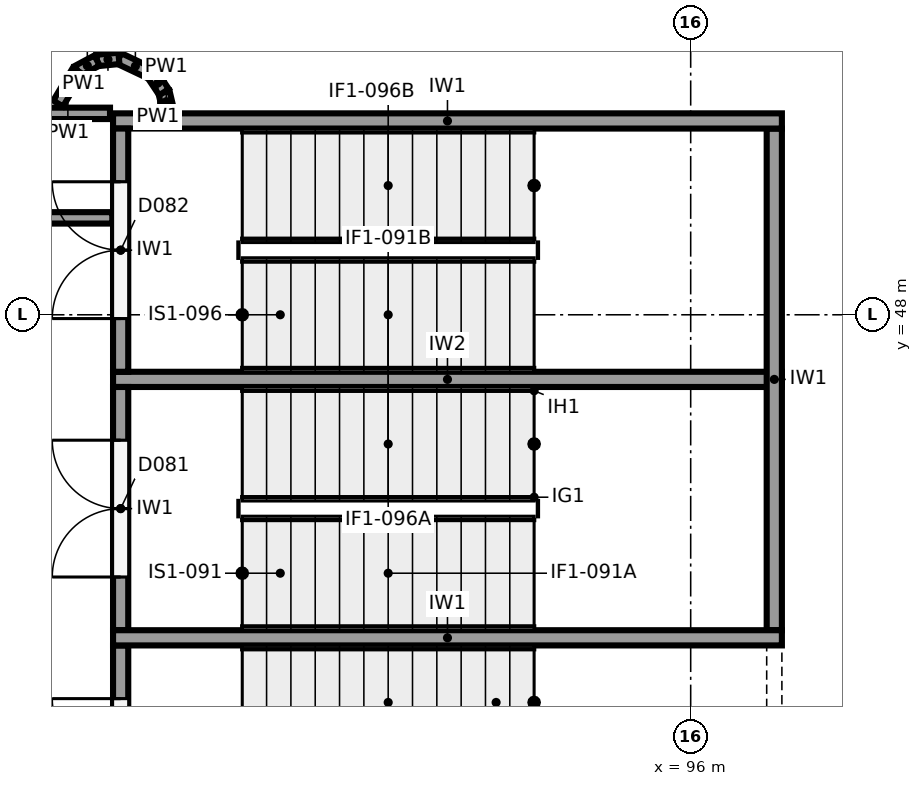
"""IFC4 building model, lengths in metres.
Left out: names, types, materials, properties, quantities, classifications, styles, units other than length and angle.
Written with IfcOpenShell. Run it as: python <this file> out.ifc"""

import sys

from ifc_helpers import new_model, si_unit, direction, frame, frame_2d, origin, place, context, subcontext, project, spatial, rectangle, extrude, element, fill, save


model = new_model("IFC4")
c1 = context("Model", 3, precision=1e-05, world=origin(), true_north=direction((0.0, 1.0)))
c2 = subcontext(c1, "Body", "Model", "MODEL_VIEW")
j1 = project(units=[si_unit("LENGTHUNIT", "METRE"), si_unit("PLANEANGLEUNIT", "RADIAN")], contexts=[c1])
p1 = place(None, origin())
s1 = spatial("IfcSite", under=j1, at=p1, CompositionType="ELEMENT")
p2 = place(p1, origin())
s2 = spatial("IfcBuilding", under=s1, at=p2, CompositionType="ELEMENT")
p3 = place(p2, frame((0.0, 0.0, -4.0)))
s3 = spatial("IfcBuildingStorey", under=s2, at=p3, CompositionType="ELEMENT", Elevation=-4.0)
for number, where, z_axis, x_axis in (
    (1, (97.2, 43.75, -1.2), (0.0, 0.0, 1.0), (-1.0, 0.0, 0.0)),
    (2, (97.2, 50.55, -1.2), (0.0, 0.0, 1.0), (-1.0, 0.0, 0.0)),
):
    element("IfcWall", number, at=place(p3, frame(where, z_axis=z_axis, x_axis=x_axis)), inside=s3, PredefinedType="SHEAR", context=c2, shape_type="SweptSolid", body=[
        extrude(rectangle(XDim=8.8, YDim=0.2, at=frame_2d((4.4, 0.0))), origin(), (0.0, 0.0, 1.0), 4.8),
    ])
for number, where, z_axis, x_axis in (
    (3, (97.1, 37.05, -1.2), (0.0, 0.0, 1.0), (0.0, 1.0, 0.0)),
    (4, (97.1, 43.85, -1.2), (0.0, 0.0, 1.0), (0.0, 1.0, 0.0)),
):
    element("IfcWall", number, at=place(p3, frame(where, z_axis=z_axis, x_axis=x_axis)), inside=s3, PredefinedType="SHEAR", context=c2, shape_type="SweptSolid", body=[
        extrude(rectangle(XDim=6.6, YDim=0.2, at=frame_2d((3.3, 0.0))), origin(), (0.0, 0.0, 1.0), 4.8),
    ])
p4 = place(p3, frame((97.2, 47.15, -1.2), z_axis=(0.0, 0.0, 1.0), x_axis=(-1.0, 0.0, 0.0)))
e5 = element("IfcWall", 5, at=p4, inside=s3, PredefinedType="SHEAR", context=c2, shape_type="SweptSolid", body=[
    extrude(rectangle(XDim=8.8, YDim=0.2, at=frame_2d((4.4, 0.0))), origin(), (0.0, 0.0, 1.0), 4.8),
])
p5 = place(p3, frame((88.5, 40.45, -1.2), z_axis=(0.0, 0.0, 1.0), x_axis=(0.0, 1.0, 0.0)))
e6 = element("IfcWall", 6, at=p5, inside=s3, PredefinedType="SHEAR", context=c2, shape_type="SweptSolid", body=[
    extrude(rectangle(XDim=3.2, YDim=0.2, at=frame_2d((1.6, 0.0))), origin(), (0.0, 0.0, 1.0), 4.8),
])
p6 = place(p5, frame((0.7, 0.0, 1.2)))
e7 = element("IfcOpeningElement", 7, at=p6, cuts=e6, PredefinedType="OPENING", context=c2, shape_type="SweptSolid", body=[
    extrude(rectangle(XDim=1.8, YDim=2.1, at=frame_2d((0.9, 1.05))), frame((0.0, 0.11, 0.0), z_axis=(0.0, -1.0, 0.0), x_axis=(1.0, 0.0, 0.0)), (0.0, 0.0, 1.0), 0.22),
])
p7 = place(p3, frame((88.5, 43.85, -1.2), z_axis=(0.0, 0.0, 1.0), x_axis=(0.0, 1.0, 0.0)))
e8 = element("IfcWall", 8, at=p7, inside=s3, PredefinedType="SHEAR", context=c2, shape_type="SweptSolid", body=[
    extrude(rectangle(XDim=3.2, YDim=0.2, at=frame_2d((1.6, 0.0))), origin(), (0.0, 0.0, 1.0), 4.8),
])
p8 = place(p7, frame((0.7, 0.0, 1.2)))
e9 = element("IfcOpeningElement", 9, at=p8, cuts=e8, PredefinedType="OPENING", context=c2, shape_type="SweptSolid", body=[
    extrude(rectangle(XDim=1.8, YDim=2.1, at=frame_2d((0.9, 1.05))), frame((0.0, 0.11, 0.0), z_axis=(0.0, -1.0, 0.0), x_axis=(1.0, 0.0, 0.0)), (0.0, 0.0, 1.0), 0.22),
])
p9 = place(p3, frame((88.5, 47.25, -1.2), z_axis=(0.0, 0.0, 1.0), x_axis=(0.0, 1.0, 0.0)))
e10 = element("IfcWall", 10, at=p9, inside=s3, PredefinedType="SHEAR", context=c2, shape_type="SweptSolid", body=[
    extrude(rectangle(XDim=3.2, YDim=0.2, at=frame_2d((1.6, 0.0))), origin(), (0.0, 0.0, 1.0), 4.8),
])
p10 = place(p9, frame((0.7, 0.0, 1.2)))
e11 = element("IfcOpeningElement", 11, at=p10, cuts=e10, PredefinedType="OPENING", context=c2, shape_type="SweptSolid", body=[
    extrude(rectangle(XDim=1.8, YDim=2.1, at=frame_2d((0.9, 1.05))), frame((0.0, 0.11, 0.0), z_axis=(0.0, -1.0, 0.0), x_axis=(1.0, 0.0, 0.0)), (0.0, 0.0, 1.0), 0.22),
])
p11 = place(p3, frame((88.36, 50.65, 0.0), z_axis=(0.0, 0.0, 1.0), x_axis=(-1.0, 0.0, 0.0)))
e12 = element("IfcWall", 12, at=p11, inside=s3, PredefinedType="PARTITIONING", context=c2, shape_type="SweptSolid", body=[
    extrude(rectangle(XDim=3.48, YDim=0.15, at=frame_2d((1.74, 0.0))), origin(), (0.0, 0.0, 1.0), 3.6),
])
p12 = place(p11, frame((1.2, 0.0, 0.0)))
e13 = element("IfcOpeningElement", 13, at=p12, cuts=e12, PredefinedType="OPENING", context=c2, shape_type="SweptSolid", body=[
    extrude(rectangle(XDim=1.0, YDim=2.1, at=frame_2d((0.5, 1.05))), frame((0.0, 0.085, 0.0), z_axis=(0.0, -1.0, 0.0), x_axis=(1.0, 0.0, 0.0)), (0.0, 0.0, 1.0), 0.17),
])
p13 = place(p3, frame((88.39, 49.275, 0.0), z_axis=(0.0, 0.0, 1.0), x_axis=(-1.0, 0.0, 0.0)))
e14 = element("IfcWall", 14, at=p13, inside=s3, PredefinedType="PARTITIONING", context=c2, shape_type="SweptSolid", body=[
    extrude(rectangle(XDim=2.465, YDim=0.15, at=frame_2d((1.232, 0.0))), origin(), (0.0, 0.0, 1.0), 3.6),
])
p14 = place(p3, frame((89.13, 50.678, 0.0), z_axis=(0.0, 0.0, 1.0), x_axis=(-0.231150896285, 0.972917911823, 0.0)))
e15 = element("IfcWall", 15, at=p14, inside=s3, PredefinedType="PARTITIONING", context=c2, shape_type="SweptSolid", body=[
    extrude(rectangle(XDim=0.258, YDim=0.15, at=frame_2d((0.129, 0.0))), origin(), (0.0, 0.0, 1.0), 3.6),
])
p15 = place(p3, frame((89.07, 50.929, 0.0), z_axis=(0.0, 0.0, 1.0), x_axis=(-0.555678694372, 0.831397130511, 0.0)))
e16 = element("IfcWall", 16, at=p15, inside=s3, PredefinedType="PARTITIONING", context=c2, shape_type="SweptSolid", body=[
    extrude(rectangle(XDim=0.288, YDim=0.15, at=frame_2d((0.144, 0.0))), origin(), (0.0, 0.0, 1.0), 3.6),
])
p16 = place(p3, frame((88.91, 51.168, 0.0), z_axis=(0.0, 0.0, 1.0), x_axis=(-0.903893315025, 0.427757963167, 0.0)))
e17 = element("IfcWall", 17, at=p16, inside=s3, PredefinedType="PARTITIONING", context=c2, shape_type="SweptSolid", body=[
    extrude(rectangle(XDim=0.479, YDim=0.15, at=frame_2d((0.24, 0.0))), origin(), (0.0, 0.0, 1.0), 3.6),
])
for number, where, z_axis, x_axis in (
    (18, (88.477, 51.374, 0.0), (0.0, 0.0, 1.0), (-0.995, -0.098, 0.0)),
    (19, (88.189, 51.345, 0.0), (0.0, 0.0, 1.0), (-0.882, -0.472, 0.0)),
):
    element("IfcWall", number, at=place(p3, frame(where, z_axis=z_axis, x_axis=x_axis)), inside=s3, PredefinedType="PARTITIONING", context=c2, shape_type="SweptSolid", body=[
        extrude(rectangle(XDim=0.289, YDim=0.15, at=frame_2d((0.145, 0.0))), origin(), (0.0, 0.0, 1.0), 3.6),
    ])
p17 = place(p3, frame((87.934, 51.209, 0.0), z_axis=(0.0, 0.0, 1.0), x_axis=(-0.513060623194, -0.858352373404, 0.0)))
e20 = element("IfcWall", 20, at=p17, inside=s3, PredefinedType="PARTITIONING", context=c2, shape_type="SweptSolid", body=[
    extrude(rectangle(XDim=0.5, YDim=0.15, at=frame_2d((0.25, 0.0))), origin(), (0.0, 0.0, 1.0), 3.6),
])
p18 = place(p6, origin())
e21 = element("IfcDoor", 21, at=p18, inside=s3, OperationType="DOUBLE_DOOR_SINGLE_SWING", PredefinedType="DOOR", context=c2, shape_type="SweptSolid", body=[
    extrude(rectangle(XDim=1.8, YDim=2.1, at=frame_2d((0.9, 1.05))), frame((0.0, 0.025, 0.0), z_axis=(0.0, -1.0, 0.0), x_axis=(1.0, 0.0, 0.0)), (0.0, 0.0, 1.0), 0.05),
])
fill(e7, e21)
p19 = place(p8, origin())
e22 = element("IfcDoor", 22, at=p19, inside=s3, OperationType="DOUBLE_DOOR_SINGLE_SWING", PredefinedType="DOOR", context=c2, shape_type="SweptSolid", body=[
    extrude(rectangle(XDim=1.8, YDim=2.1, at=frame_2d((0.9, 1.05))), frame((0.0, 0.025, 0.0), z_axis=(0.0, -1.0, 0.0), x_axis=(1.0, 0.0, 0.0)), (0.0, 0.0, 1.0), 0.05),
])
fill(e9, e22)
p20 = place(p10, origin())
e23 = element("IfcDoor", 23, at=p20, inside=s3, OperationType="DOUBLE_DOOR_SINGLE_SWING", PredefinedType="DOOR", context=c2, shape_type="SweptSolid", body=[
    extrude(rectangle(XDim=1.8, YDim=2.1, at=frame_2d((0.9, 1.05))), frame((0.0, 0.025, 0.0), z_axis=(0.0, -1.0, 0.0), x_axis=(1.0, 0.0, 0.0)), (0.0, 0.0, 1.0), 0.05),
])
fill(e11, e23)
save(model, sys.argv[1])
